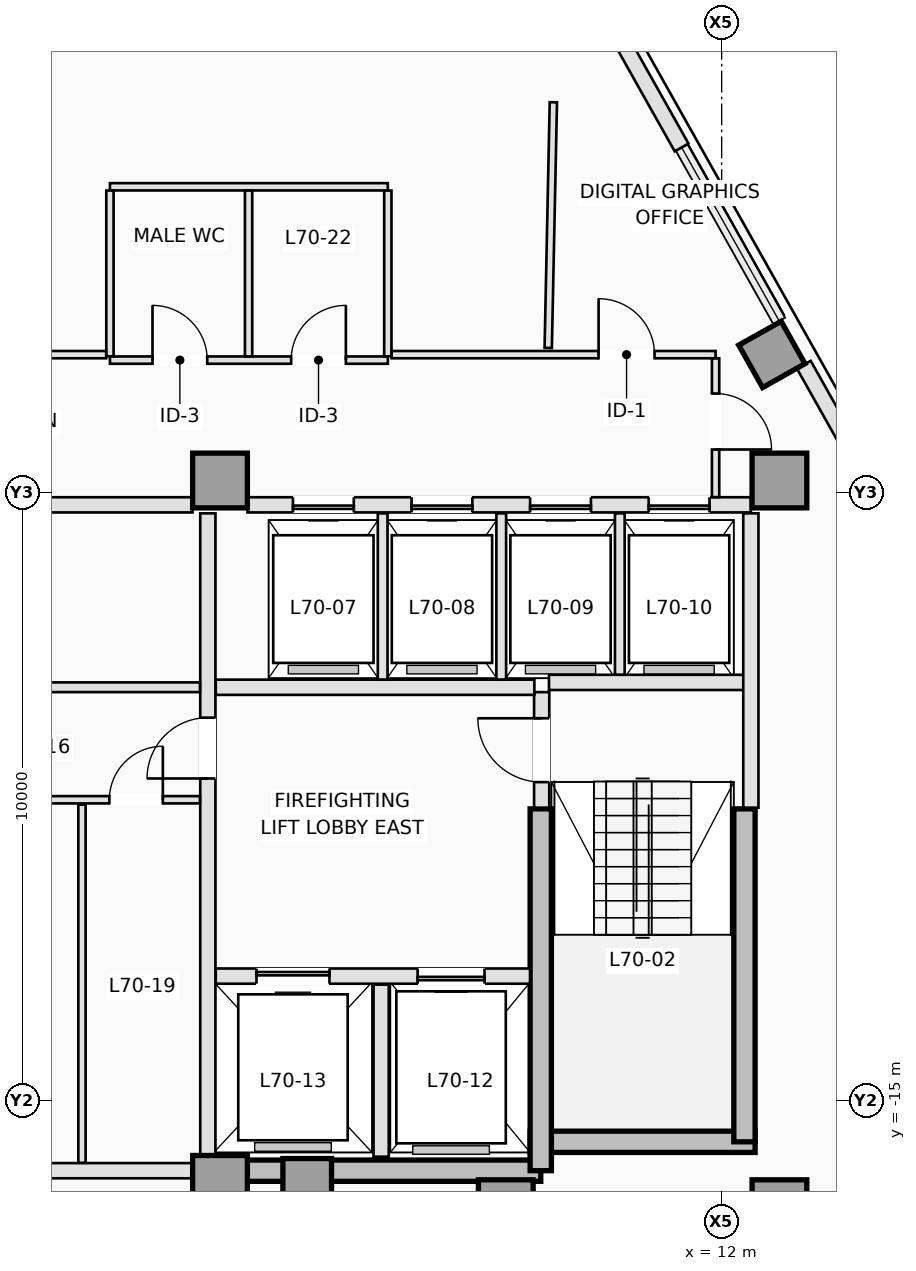
"""IFC4 building model, lengths in metres.
Left out: names, types, materials, properties, quantities, classifications, styles, units other than length and angle.
Written with IfcOpenShell. Run it as: python <this file> out.ifc"""

import sys

from ifc_helpers import new_model, si_unit, direction, frame, frame_2d, origin, origin_2d, place, context, subcontext, project, spatial, rectangle, extrude, element, fill, save


model = new_model("IFC4")
c1 = context("Model", 3, precision=1e-05, world=origin(), true_north=direction((0.0, 1.0)))
c2 = subcontext(c1, "Body", "Model", "MODEL_VIEW")
j1 = project(units=[si_unit("LENGTHUNIT", "METRE"), si_unit("PLANEANGLEUNIT", "RADIAN")], contexts=[c1])
p1 = place(None, origin())
s1 = spatial("IfcSite", under=j1, at=p1, CompositionType="ELEMENT")
p2 = place(p1, origin())
s2 = spatial("IfcBuilding", under=s1, at=p2, CompositionType="ELEMENT")
p3 = place(p2, frame((0.0, 0.0, 253.4)))
s3 = spatial("IfcBuildingStorey", under=s2, at=p3, CompositionType="ELEMENT", Elevation=253.4)
p4 = place(p3, frame((3.75, -16.15, 0.0), z_axis=(0.0, 0.0, 1.0), x_axis=(1.0, 0.0, 0.0)))
e1 = element("IfcWall", 1, at=p4, inside=s3, PredefinedType="SHEAR", context=c2, shape_type="SweptSolid", body=[
    extrude(rectangle(XDim=5.275, YDim=0.35, at=frame_2d((2.637, 0.0))), origin(), (0.0, 0.0, 1.0), 3.5),
])
p5 = place(p3, frame((8.85, -15.675, 0.0), z_axis=(0.0, 0.0, 1.0), x_axis=(1.0, 0.0, 0.0)))
e2 = element("IfcWall", 2, at=p5, inside=s3, PredefinedType="SHEAR", context=c2, shape_type="SweptSolid", body=[
    extrude(rectangle(XDim=3.7, YDim=0.35, at=frame_2d((1.85, 0.0))), origin(), (0.0, 0.0, 1.0), 3.5),
])
p6 = place(p3, frame((12.375, -15.675, 0.0), z_axis=(0.0, 0.0, 1.0), x_axis=(0.0, 1.0, 0.0)))
e3 = element("IfcWall", 3, at=p6, inside=s3, PredefinedType="SHEAR", context=c2, shape_type="SweptSolid", body=[
    extrude(rectangle(XDim=5.475, YDim=0.35, at=frame_2d((2.738, 0.0))), origin(), (0.0, 0.0, 1.0), 3.5),
])
p7 = place(p3, frame((9.025, -16.15, 0.0), z_axis=(0.0, 0.0, 1.0), x_axis=(0.0, 1.0, 0.0)))
e4 = element("IfcWall", 4, at=p7, inside=s3, PredefinedType="SHEAR", context=c2, shape_type="SweptSolid", body=[
    extrude(rectangle(XDim=5.95, YDim=0.35, at=frame_2d((2.975, 0.0))), origin(), (0.0, 0.0, 1.0), 3.5),
])
for number, where, z_axis, x_axis in (
    (5, (3.75, -16.35, 0.0), (0.0, 0.0, 1.0), (1.0, 0.0, 0.0)),
    (6, (8.45, -16.75, 0.0), (0.0, 0.0, 1.0), (1.0, 0.0, 0.0)),
    (7, (12.95, -16.75, 0.0), (0.0, 0.0, 1.0), (1.0, 0.0, 0.0)),
    (8, (3.75, -4.8, 0.0), (0.0, 0.0, 1.0), (1.0, 0.0, 0.0)),
    (9, (12.95, -4.8, 0.0), (0.0, 0.0, 1.0), (1.0, 0.0, 0.0)),
):
    element("IfcColumn", number, at=place(p3, frame(where, z_axis=z_axis, x_axis=x_axis)), inside=s3, PredefinedType="COLUMN", context=c2, shape_type="SweptSolid", body=[
        extrude(rectangle(XDim=0.9, YDim=0.9, at=origin_2d()), origin(), (0.0, 0.0, 1.0), 3.5),
    ])
for number, where, z_axis, x_axis in (
    (10, (5.184, -16.35, 0.0), (0.0, 0.0, 1.0), (0.0, 1.0, 0.0)),
    (11, (12.825, -2.727, 0.0), (0.0, 0.0, 1.0), (0.872, 0.49, 0.0)),
):
    element("IfcColumn", number, at=place(p3, frame(where, z_axis=z_axis, x_axis=x_axis)), inside=s3, PredefinedType="COLUMN", context=c2, shape_type="SweptSolid", body=[
        extrude(rectangle(XDim=0.8, YDim=0.8, at=origin_2d()), origin(), (0.0, 0.0, 1.0), 3.5),
    ])
p8 = place(p3, frame((13.351, -2.896, 0.0), z_axis=(0.0, 0.0, 1.0), x_axis=(0.490266968583, -0.871572314565, 0.0)))
e12 = element("IfcWall", 12, at=p8, inside=s3, PredefinedType="STANDARD", context=c2, shape_type="SweptSolid", body=[
    extrude(rectangle(XDim=10.116, YDim=0.26, at=frame_2d((5.058, 0.0))), origin(), (0.0, 0.0, 1.0), 3.25),
])
p9 = place(p3, frame((9.779, 3.454, 0.0), z_axis=(0.0, 0.0, 1.0), x_axis=(0.490268515903, -0.871571444182, 0.0)))
e13 = element("IfcWall", 13, at=p9, inside=s3, PredefinedType="STANDARD", context=c2, shape_type="SweptSolid", body=[
    extrude(rectangle(XDim=3.186, YDim=0.26, at=frame_2d((1.593, 0.0))), origin(), (0.0, 0.0, 1.0), 3.25),
])
p10 = place(p3, frame((9.04, -10.18, 0.0), z_axis=(0.0, 0.0, 1.0), x_axis=(0.0, 1.0, 0.0)))
e14 = element("IfcWall", 14, at=p10, inside=s3, PredefinedType="PARTITIONING", context=c2, shape_type="SweptSolid", body=[
    extrude(rectangle(XDim=1.9, YDim=0.25, at=frame_2d((0.95, 0.0))), origin(), (0.0, 0.0, 1.0), 3.25),
])
p11 = place(p10, frame((0.42, 0.0, 0.0)))
e15 = element("IfcOpeningElement", 15, at=p11, cuts=e14, PredefinedType="OPENING", context=c2, shape_type="SweptSolid", body=[
    extrude(rectangle(XDim=1.05, YDim=2.15, at=frame_2d((0.525, 1.075))), frame((0.0, 0.135, 0.0), z_axis=(0.0, -1.0, 0.0), x_axis=(1.0, 0.0, 0.0)), (0.0, 0.0, 1.0), 0.27),
])
p12 = place(p3, frame((9.16, -8.12, 0.0), z_axis=(0.0, 0.0, 1.0), x_axis=(1.0, 0.0, 0.0)))
e16 = element("IfcWall", 16, at=p12, inside=s3, PredefinedType="PARTITIONING", context=c2, shape_type="SweptSolid", body=[
    extrude(rectangle(XDim=3.22, YDim=0.25, at=frame_2d((1.61, 0.0))), origin(), (0.0, 0.0, 1.0), 3.25),
])
p13 = place(p3, frame((12.48, -10.18, 0.0), z_axis=(0.0, 0.0, 1.0), x_axis=(0.0, 1.0, 0.0)))
e17 = element("IfcWall", 17, at=p13, inside=s3, PredefinedType="PARTITIONING", context=c2, shape_type="SweptSolid", body=[
    extrude(rectangle(XDim=4.84, YDim=0.25, at=frame_2d((2.42, 0.0))), origin(), (0.0, 0.0, 1.0), 3.25),
])
p14 = place(p3, frame((3.68, -12.95, 0.0), z_axis=(0.0, 0.0, 1.0), x_axis=(1.0, 0.0, 0.0)))
e18 = element("IfcWall", 18, at=p14, inside=s3, PredefinedType="PARTITIONING", context=c2, shape_type="SweptSolid", body=[
    extrude(rectangle(XDim=5.168, YDim=0.25, at=frame_2d((2.584, 0.0))), origin(), (0.0, 0.0, 1.0), 3.25),
])
p15 = place(p14, frame((3.32, 0.0, 0.0)))
e19 = element("IfcOpeningElement", 19, at=p15, cuts=e18, PredefinedType="OPENING", context=c2, shape_type="SweptSolid", body=[
    extrude(rectangle(XDim=1.1, YDim=2.15, at=frame_2d((0.55, 1.075))), frame((0.0, 0.135, 0.0), z_axis=(0.0, -1.0, 0.0), x_axis=(1.0, 0.0, 0.0)), (0.0, 0.0, 1.0), 0.27),
])
p16 = place(p14, frame((0.67, 0.0, 0.0)))
e20 = element("IfcOpeningElement", 20, at=p16, cuts=e18, PredefinedType="OPENING", context=c2, shape_type="SweptSolid", body=[
    extrude(rectangle(XDim=1.2, YDim=2.15, at=frame_2d((0.6, 1.075))), frame((0.0, 0.135, 0.0), z_axis=(0.0, -1.0, 0.0), x_axis=(1.0, 0.0, 0.0)), (0.0, 0.0, 1.0), 0.27),
])
p17 = place(p3, frame((6.4, -15.92, 0.0), z_axis=(0.0, 0.0, 1.0), x_axis=(0.0, 1.0, 0.0)))
e21 = element("IfcWall", 21, at=p17, inside=s3, PredefinedType="PARTITIONING", context=c2, shape_type="SweptSolid", body=[
    extrude(rectangle(XDim=2.83, YDim=0.25, at=frame_2d((1.415, 0.0))), origin(), (0.0, 0.0, 1.0), 3.25),
])
p18 = place(p3, frame((3.68, -8.2, 0.0), z_axis=(0.0, 0.0, 1.0), x_axis=(1.0, 0.0, 0.0)))
e22 = element("IfcWall", 22, at=p18, inside=s3, PredefinedType="PARTITIONING", context=c2, shape_type="SweptSolid", body=[
    extrude(rectangle(XDim=5.24, YDim=0.25, at=frame_2d((2.62, 0.0))), origin(), (0.0, 0.0, 1.0), 3.25),
])
p19 = place(p3, frame((3.55, -15.898, 0.0), z_axis=(0.0, 0.0, 1.0), x_axis=(0.0, 1.0, 0.0)))
e23 = element("IfcWall", 23, at=p19, inside=s3, PredefinedType="PARTITIONING", context=c2, shape_type="SweptSolid", body=[
    extrude(rectangle(XDim=10.558, YDim=0.25, at=frame_2d((5.279, 0.0))), origin(), (0.0, 0.0, 1.0), 3.25),
])
p20 = place(p19, frame((6.198, 0.0, 0.0)))
e24 = element("IfcOpeningElement", 24, at=p20, cuts=e23, PredefinedType="OPENING", context=c2, shape_type="SweptSolid", body=[
    extrude(rectangle(XDim=1.0, YDim=2.15, at=frame_2d((0.5, 1.075))), frame((0.0, 0.135, 0.0), z_axis=(0.0, -1.0, 0.0), x_axis=(1.0, 0.0, 0.0)), (0.0, 0.0, 1.0), 0.27),
])
p21 = place(p3, frame((4.202, -5.2, 0.0), z_axis=(0.0, 0.0, 1.0), x_axis=(1.0, 0.0, 0.0)))
e25 = element("IfcWall", 25, at=p21, inside=s3, PredefinedType="PARTITIONING", context=c2, shape_type="SweptSolid", body=[
    extrude(rectangle(XDim=8.278, YDim=0.25, at=frame_2d((4.139, 0.0))), origin(), (0.0, 0.0, 1.0), 3.25),
])
p22 = place(p21, frame((0.748, 0.0, 0.0)))
e26 = element("IfcOpeningElement", 26, at=p22, cuts=e25, PredefinedType="OPENING", context=c2, shape_type="SweptSolid", body=[
    extrude(rectangle(XDim=1.0, YDim=2.15, at=frame_2d((0.5, 1.075))), frame((0.0, 0.135, 0.0), z_axis=(0.0, -1.0, 0.0), x_axis=(1.0, 0.0, 0.0)), (0.0, 0.0, 1.0), 0.27),
])
p23 = place(p21, frame((2.698, 0.0, 0.0)))
e27 = element("IfcOpeningElement", 27, at=p23, cuts=e25, PredefinedType="OPENING", context=c2, shape_type="SweptSolid", body=[
    extrude(rectangle(XDim=1.0, YDim=2.15, at=frame_2d((0.5, 1.075))), frame((0.0, 0.135, 0.0), z_axis=(0.0, -1.0, 0.0), x_axis=(1.0, 0.0, 0.0)), (0.0, 0.0, 1.0), 0.27),
])
p24 = place(p21, frame((4.648, 0.0, 0.0)))
e28 = element("IfcOpeningElement", 28, at=p24, cuts=e25, PredefinedType="OPENING", context=c2, shape_type="SweptSolid", body=[
    extrude(rectangle(XDim=1.0, YDim=2.15, at=frame_2d((0.5, 1.075))), frame((0.0, 0.135, 0.0), z_axis=(0.0, -1.0, 0.0), x_axis=(1.0, 0.0, 0.0)), (0.0, 0.0, 1.0), 0.27),
])
p25 = place(p21, frame((6.598, 0.0, 0.0)))
e29 = element("IfcOpeningElement", 29, at=p25, cuts=e25, PredefinedType="OPENING", context=c2, shape_type="SweptSolid", body=[
    extrude(rectangle(XDim=1.0, YDim=2.15, at=frame_2d((0.5, 1.075))), frame((0.0, 0.135, 0.0), z_axis=(0.0, -1.0, 0.0), x_axis=(1.0, 0.0, 0.0)), (0.0, 0.0, 1.0), 0.27),
])
p26 = place(p3, frame((0.95, -5.2, 0.0), z_axis=(0.0, 0.0, 1.0), x_axis=(1.0, 0.0, 0.0)))
e30 = element("IfcWall", 30, at=p26, inside=s3, PredefinedType="PARTITIONING", context=c2, shape_type="SweptSolid", body=[
    extrude(rectangle(XDim=2.348, YDim=0.25, at=frame_2d((1.174, 0.0))), origin(), (0.0, 0.0, 1.0), 3.25),
])
for number, where, z_axis, x_axis in (
    (31, (6.425, -8.073, 0.0), (0.0, 0.0, 1.0), (0.0, 1.0, 0.0)),
    (32, (8.375, -8.073, 0.0), (0.0, 0.0, 1.0), (0.0, 1.0, 0.0)),
):
    element("IfcWall", number, at=place(p3, frame(where, z_axis=z_axis, x_axis=x_axis)), inside=s3, PredefinedType="PARTITIONING", context=c2, shape_type="SweptSolid", body=[
        extrude(rectangle(XDim=2.733, YDim=0.16, at=frame_2d((1.366, 0.0))), origin(), (0.0, 0.0, 1.0), 3.25),
    ])
p27 = place(p3, frame((10.325, -7.993, 0.0), z_axis=(0.0, 0.0, 1.0), x_axis=(0.0, 1.0, 0.0)))
e33 = element("IfcWall", 33, at=p27, inside=s3, PredefinedType="PARTITIONING", context=c2, shape_type="SweptSolid", body=[
    extrude(rectangle(XDim=2.653, YDim=0.16, at=frame_2d((1.326, 0.0))), origin(), (0.0, 0.0, 1.0), 3.25),
])
p28 = place(p3, frame((-3.298, -16.15, 0.0), z_axis=(0.0, 0.0, 1.0), x_axis=(1.0, 0.0, 0.0)))
e34 = element("IfcWall", 34, at=p28, inside=s3, PredefinedType="PARTITIONING", context=c2, shape_type="SweptSolid", body=[
    extrude(rectangle(XDim=6.596, YDim=0.25, at=frame_2d((3.298, 0.0))), origin(), (0.0, 0.0, 1.0), 2.844),
])
p29 = place(p3, frame((-3.42, -8.2, 0.0), z_axis=(0.0, 0.0, 1.0), x_axis=(1.0, 0.0, 0.0)))
e35 = element("IfcWall", 35, at=p29, inside=s3, PredefinedType="PARTITIONING", context=c2, shape_type="SweptSolid", body=[
    extrude(rectangle(XDim=6.84, YDim=0.16, at=frame_2d((3.42, 0.0))), origin(), (0.0, 0.0, 1.0), 3.25),
])
p30 = place(p29, frame((2.92, 0.0, 0.0)))
e36 = element("IfcOpeningElement", 36, at=p30, cuts=e35, PredefinedType="OPENING", context=c2, shape_type="SweptSolid", body=[
    extrude(rectangle(XDim=1.0, YDim=2.15, at=frame_2d((0.5, 1.075))), frame((0.0, 0.09, 0.0), z_axis=(0.0, -1.0, 0.0), x_axis=(1.0, 0.0, 0.0)), (0.0, 0.0, 1.0), 0.18),
])
p31 = place(p3, frame((-3.42, -10.05, 0.0), z_axis=(0.0, 0.0, 1.0), x_axis=(1.0, 0.0, 0.0)))
e37 = element("IfcWall", 37, at=p31, inside=s3, PredefinedType="PARTITIONING", context=c2, shape_type="SweptSolid", body=[
    extrude(rectangle(XDim=6.84, YDim=0.12, at=frame_2d((3.42, 0.0))), origin(), (0.0, 0.0, 1.0), 3.25),
])
p32 = place(p31, frame((1.85, 0.0, 0.0)))
e38 = element("IfcOpeningElement", 38, at=p32, cuts=e37, PredefinedType="OPENING", context=c2, shape_type="SweptSolid", body=[
    extrude(rectangle(XDim=0.92, YDim=2.12, at=frame_2d((0.46, 1.06))), frame((0.0, 0.07, 0.0), z_axis=(0.0, -1.0, 0.0), x_axis=(1.0, 0.0, 0.0)), (0.0, 0.0, 1.0), 0.14),
])
p33 = place(p31, frame((5.35, 0.0, 0.0)))
e39 = element("IfcOpeningElement", 39, at=p33, cuts=e37, PredefinedType="OPENING", context=c2, shape_type="SweptSolid", body=[
    extrude(rectangle(XDim=0.88, YDim=2.12, at=frame_2d((0.44, 1.06))), frame((0.0, 0.07, 0.0), z_axis=(0.0, -1.0, 0.0), x_axis=(1.0, 0.0, 0.0)), (0.0, 0.0, 1.0), 0.14),
])
p34 = place(p3, frame((1.48, -16.02, 0.0), z_axis=(0.0, 0.0, 1.0), x_axis=(0.0, 1.0, 0.0)))
e40 = element("IfcWall", 40, at=p34, inside=s3, PredefinedType="PARTITIONING", context=c2, shape_type="SweptSolid", body=[
    extrude(rectangle(XDim=5.89, YDim=0.12, at=frame_2d((2.945, 0.0))), origin(), (0.0, 0.0, 1.0), 3.25),
])
p35 = place(p3, frame((1.94, -2.82, 0.0), z_axis=(0.0, 0.0, 1.0), x_axis=(1.0, 0.0, 0.0)))
e41 = element("IfcWall", 41, at=p35, inside=s3, PredefinedType="PARTITIONING", context=c2, shape_type="SweptSolid", body=[
    extrude(rectangle(XDim=4.57, YDim=0.12, at=frame_2d((2.285, 0.0))), origin(), (0.0, 0.0, 1.0), 2.943),
])
p36 = place(p35, frame((0.7, 0.0, 0.0)))
e42 = element("IfcOpeningElement", 42, at=p36, cuts=e41, PredefinedType="OPENING", context=c2, shape_type="SweptSolid", body=[
    extrude(rectangle(XDim=0.9, YDim=2.12, at=frame_2d((0.45, 1.06))), frame((0.0, 0.07, 0.0), z_axis=(0.0, -1.0, 0.0), x_axis=(1.0, 0.0, 0.0)), (0.0, 0.0, 1.0), 0.14),
])
p37 = place(p35, frame((2.98, 0.0, 0.0)))
e43 = element("IfcOpeningElement", 43, at=p37, cuts=e41, PredefinedType="OPENING", context=c2, shape_type="SweptSolid", body=[
    extrude(rectangle(XDim=0.9, YDim=2.12, at=frame_2d((0.45, 1.06))), frame((0.0, 0.07, 0.0), z_axis=(0.0, -1.0, 0.0), x_axis=(1.0, 0.0, 0.0)), (0.0, 0.0, 1.0), 0.14),
])
p38 = place(p3, frame((1.94, 0.03, 0.0), z_axis=(0.0, 0.0, 1.0), x_axis=(1.0, 0.0, 0.0)))
e44 = element("IfcWall", 44, at=p38, inside=s3, PredefinedType="PARTITIONING", context=c2, shape_type="SweptSolid", body=[
    extrude(rectangle(XDim=4.57, YDim=0.12, at=frame_2d((2.285, 0.0))), origin(), (0.0, 0.0, 1.0), 3.25),
])
for number, where, z_axis, x_axis in (
    (45, (1.94, -2.758, 0.0), (0.0, 0.0, 1.0), (0.0, 1.0, 0.0)),
    (46, (4.22, -2.758, 0.0), (0.0, 0.0, 1.0), (0.0, 1.0, 0.0)),
    (47, (6.51, -2.758, 0.0), (0.0, 0.0, 1.0), (0.0, 1.0, 0.0)),
):
    element("IfcWall", number, at=place(p3, frame(where, z_axis=z_axis, x_axis=x_axis)), inside=s3, PredefinedType="PARTITIONING", context=c2, shape_type="SweptSolid", body=[
        extrude(rectangle(XDim=2.726, YDim=0.12, at=frame_2d((1.363, 0.0))), origin(), (0.0, 0.0, 1.0), 3.25),
    ])
p39 = place(p3, frame((0.762, -2.73, 0.0), z_axis=(0.0, 0.0, 1.0), x_axis=(1.0, 0.0, 0.0)))
e48 = element("IfcWall", 48, at=p39, inside=s3, PredefinedType="PARTITIONING", context=c2, shape_type="SweptSolid", body=[
    extrude(rectangle(XDim=1.116, YDim=0.12, at=frame_2d((0.558, 0.0))), origin(), (0.0, 0.0, 1.0), 2.943),
])
p40 = place(p3, frame((6.572, -2.73, 0.0), z_axis=(0.0, 0.0, 1.0), x_axis=(1.0, 0.0, 0.0)))
e49 = element("IfcWall", 49, at=p40, inside=s3, PredefinedType="PARTITIONING", context=c2, shape_type="SweptSolid", body=[
    extrude(rectangle(XDim=5.328, YDim=0.12, at=frame_2d((2.664, 0.0))), origin(), (0.0, 0.0, 1.0), 3.25),
])
p41 = place(p40, frame((3.404, 0.0, 0.0)))
e50 = element("IfcOpeningElement", 50, at=p41, cuts=e49, PredefinedType="OPENING", context=c2, shape_type="SweptSolid", body=[
    extrude(rectangle(XDim=0.92, YDim=2.12, at=frame_2d((0.46, 1.06))), frame((0.0, 0.07, 0.0), z_axis=(0.0, -1.0, 0.0), x_axis=(1.0, 0.0, 0.0)), (0.0, 0.0, 1.0), 0.14),
])
p42 = place(p3, frame((11.9, -2.792, 0.0), z_axis=(0.0, 0.0, 1.0), x_axis=(0.0, -1.0, 0.0)))
e51 = element("IfcWall", 51, at=p42, inside=s3, PredefinedType="PARTITIONING", context=c2, shape_type="SweptSolid", body=[
    extrude(rectangle(XDim=2.281, YDim=0.12, at=frame_2d((1.141, 0.0))), origin(), (0.0, 0.0, 1.0), 3.25),
])
p43 = place(p42, frame((0.578, 0.0, 0.0)))
e52 = element("IfcOpeningElement", 52, at=p43, cuts=e51, PredefinedType="OPENING", context=c2, shape_type="SweptSolid", body=[
    extrude(rectangle(XDim=0.92, YDim=2.12, at=frame_2d((0.46, 1.06))), frame((0.0, 0.07, 0.0), z_axis=(0.0, -1.0, 0.0), x_axis=(1.0, 0.0, 0.0)), (0.0, 0.0, 1.0), 0.14),
])
p44 = place(p3, frame((9.232, 1.42, 0.0), z_axis=(0.0, 0.0, 1.0), x_axis=(-0.020904302181, -0.9997814812, 0.0)))
e53 = element("IfcWall", 53, at=p44, inside=s3, PredefinedType="PARTITIONING", context=c2, shape_type="SweptSolid", body=[
    extrude(rectangle(XDim=4.041, YDim=0.12, at=frame_2d((2.021, 0.0))), origin(), (0.0, 0.0, 1.0), 3.25),
])
p45 = place(p22, origin())
e54 = element("IfcDoor", 54, at=p45, inside=s3, OperationType="SLIDING_TO_RIGHT", PredefinedType="DOOR", context=c2, shape_type="SweptSolid", body=[
    extrude(rectangle(XDim=1.0, YDim=2.15, at=frame_2d((0.5, 1.075))), frame((0.0, 0.025, 0.0), z_axis=(0.0, -1.0, 0.0), x_axis=(1.0, 0.0, 0.0)), (0.0, 0.0, 1.0), 0.05),
])
fill(e26, e54)
p46 = place(p23, origin())
e55 = element("IfcDoor", 55, at=p46, inside=s3, OperationType="SLIDING_TO_RIGHT", PredefinedType="DOOR", context=c2, shape_type="SweptSolid", body=[
    extrude(rectangle(XDim=1.0, YDim=2.15, at=frame_2d((0.5, 1.075))), frame((0.0, 0.025, 0.0), z_axis=(0.0, -1.0, 0.0), x_axis=(1.0, 0.0, 0.0)), (0.0, 0.0, 1.0), 0.05),
])
fill(e27, e55)
p47 = place(p24, origin())
e56 = element("IfcDoor", 56, at=p47, inside=s3, OperationType="SLIDING_TO_RIGHT", PredefinedType="DOOR", context=c2, shape_type="SweptSolid", body=[
    extrude(rectangle(XDim=1.0, YDim=2.15, at=frame_2d((0.5, 1.075))), frame((0.0, 0.025, 0.0), z_axis=(0.0, -1.0, 0.0), x_axis=(1.0, 0.0, 0.0)), (0.0, 0.0, 1.0), 0.05),
])
fill(e28, e56)
p48 = place(p25, origin())
e57 = element("IfcDoor", 57, at=p48, inside=s3, OperationType="SLIDING_TO_RIGHT", PredefinedType="DOOR", context=c2, shape_type="SweptSolid", body=[
    extrude(rectangle(XDim=1.0, YDim=2.15, at=frame_2d((0.5, 1.075))), frame((0.0, 0.025, 0.0), z_axis=(0.0, -1.0, 0.0), x_axis=(1.0, 0.0, 0.0)), (0.0, 0.0, 1.0), 0.05),
])
fill(e29, e57)
p49 = place(p15, origin())
e58 = element("IfcDoor", 58, at=p49, inside=s3, OperationType="SLIDING_TO_RIGHT", PredefinedType="DOOR", context=c2, shape_type="SweptSolid", body=[
    extrude(rectangle(XDim=1.1, YDim=2.15, at=frame_2d((0.55, 1.075))), frame((0.0, 0.025, 0.0), z_axis=(0.0, -1.0, 0.0), x_axis=(1.0, 0.0, 0.0)), (0.0, 0.0, 1.0), 0.05),
])
fill(e19, e58)
p50 = place(p16, origin())
e59 = element("IfcDoor", 59, at=p50, inside=s3, OperationType="SLIDING_TO_LEFT", PredefinedType="DOOR", context=c2, shape_type="SweptSolid", body=[
    extrude(rectangle(XDim=1.2, YDim=2.15, at=frame_2d((0.6, 1.075))), frame((0.0, 0.025, 0.0), z_axis=(0.0, -1.0, 0.0), x_axis=(1.0, 0.0, 0.0)), (0.0, 0.0, 1.0), 0.05),
])
fill(e20, e59)
p51 = place(p11, origin())
e60 = element("IfcDoor", 60, at=p51, inside=s3, OperationType="SINGLE_SWING_RIGHT", PredefinedType="DOOR", context=c2, shape_type="SweptSolid", body=[
    extrude(rectangle(XDim=1.05, YDim=2.15, at=frame_2d((0.525, 1.075))), frame((0.0, 0.025, 0.0), z_axis=(0.0, -1.0, 0.0), x_axis=(1.0, 0.0, 0.0)), (0.0, 0.0, 1.0), 0.05),
])
fill(e15, e60)
p52 = place(p20, origin())
e61 = element("IfcDoor", 61, at=p52, inside=s3, OperationType="SINGLE_SWING_LEFT", PredefinedType="DOOR", context=c2, shape_type="SweptSolid", body=[
    extrude(rectangle(XDim=1.0, YDim=2.15, at=frame_2d((0.5, 1.075))), frame((0.0, 0.025, 0.0), z_axis=(0.0, -1.0, 0.0), x_axis=(1.0, 0.0, 0.0)), (0.0, 0.0, 1.0), 0.05),
])
fill(e24, e61)
p53 = place(p33, origin())
e62 = element("IfcDoor", 62, at=p53, inside=s3, OperationType="SINGLE_SWING_RIGHT", PredefinedType="DOOR", context=c2, shape_type="SweptSolid", body=[
    extrude(rectangle(XDim=0.88, YDim=2.12, at=frame_2d((0.44, 1.06))), frame((0.0, 0.025, 0.0), z_axis=(0.0, -1.0, 0.0), x_axis=(1.0, 0.0, 0.0)), (0.0, 0.0, 1.0), 0.05),
])
fill(e39, e62)
p54 = place(p36, origin())
e63 = element("IfcDoor", 63, at=p54, inside=s3, OperationType="SINGLE_SWING_LEFT", PredefinedType="DOOR", context=c2, shape_type="SweptSolid", body=[
    extrude(rectangle(XDim=0.9, YDim=2.12, at=frame_2d((0.45, 1.06))), frame((0.0, 0.025, 0.0), z_axis=(0.0, -1.0, 0.0), x_axis=(1.0, 0.0, 0.0)), (0.0, 0.0, 1.0), 0.05),
])
fill(e42, e63)
p55 = place(p37, origin())
e64 = element("IfcDoor", 64, at=p55, inside=s3, OperationType="SINGLE_SWING_RIGHT", PredefinedType="DOOR", context=c2, shape_type="SweptSolid", body=[
    extrude(rectangle(XDim=0.9, YDim=2.12, at=frame_2d((0.45, 1.06))), frame((0.0, 0.025, 0.0), z_axis=(0.0, -1.0, 0.0), x_axis=(1.0, 0.0, 0.0)), (0.0, 0.0, 1.0), 0.05),
])
fill(e43, e64)
p56 = place(p41, origin())
e65 = element("IfcDoor", 65, at=p56, inside=s3, OperationType="SINGLE_SWING_LEFT", PredefinedType="DOOR", context=c2, shape_type="SweptSolid", body=[
    extrude(rectangle(XDim=0.92, YDim=2.12, at=frame_2d((0.46, 1.06))), frame((0.0, 0.025, 0.0), z_axis=(0.0, -1.0, 0.0), x_axis=(1.0, 0.0, 0.0)), (0.0, 0.0, 1.0), 0.05),
])
fill(e50, e65)
p57 = place(p43, origin())
e66 = element("IfcDoor", 66, at=p57, inside=s3, OperationType="SINGLE_SWING_RIGHT", PredefinedType="DOOR", context=c2, shape_type="SweptSolid", body=[
    extrude(rectangle(XDim=0.92, YDim=2.12, at=frame_2d((0.46, 1.06))), frame((0.0, 0.025, 0.0), z_axis=(0.0, -1.0, 0.0), x_axis=(1.0, 0.0, 0.0)), (0.0, 0.0, 1.0), 0.05),
])
fill(e52, e66)
save(model, sys.argv[1])
